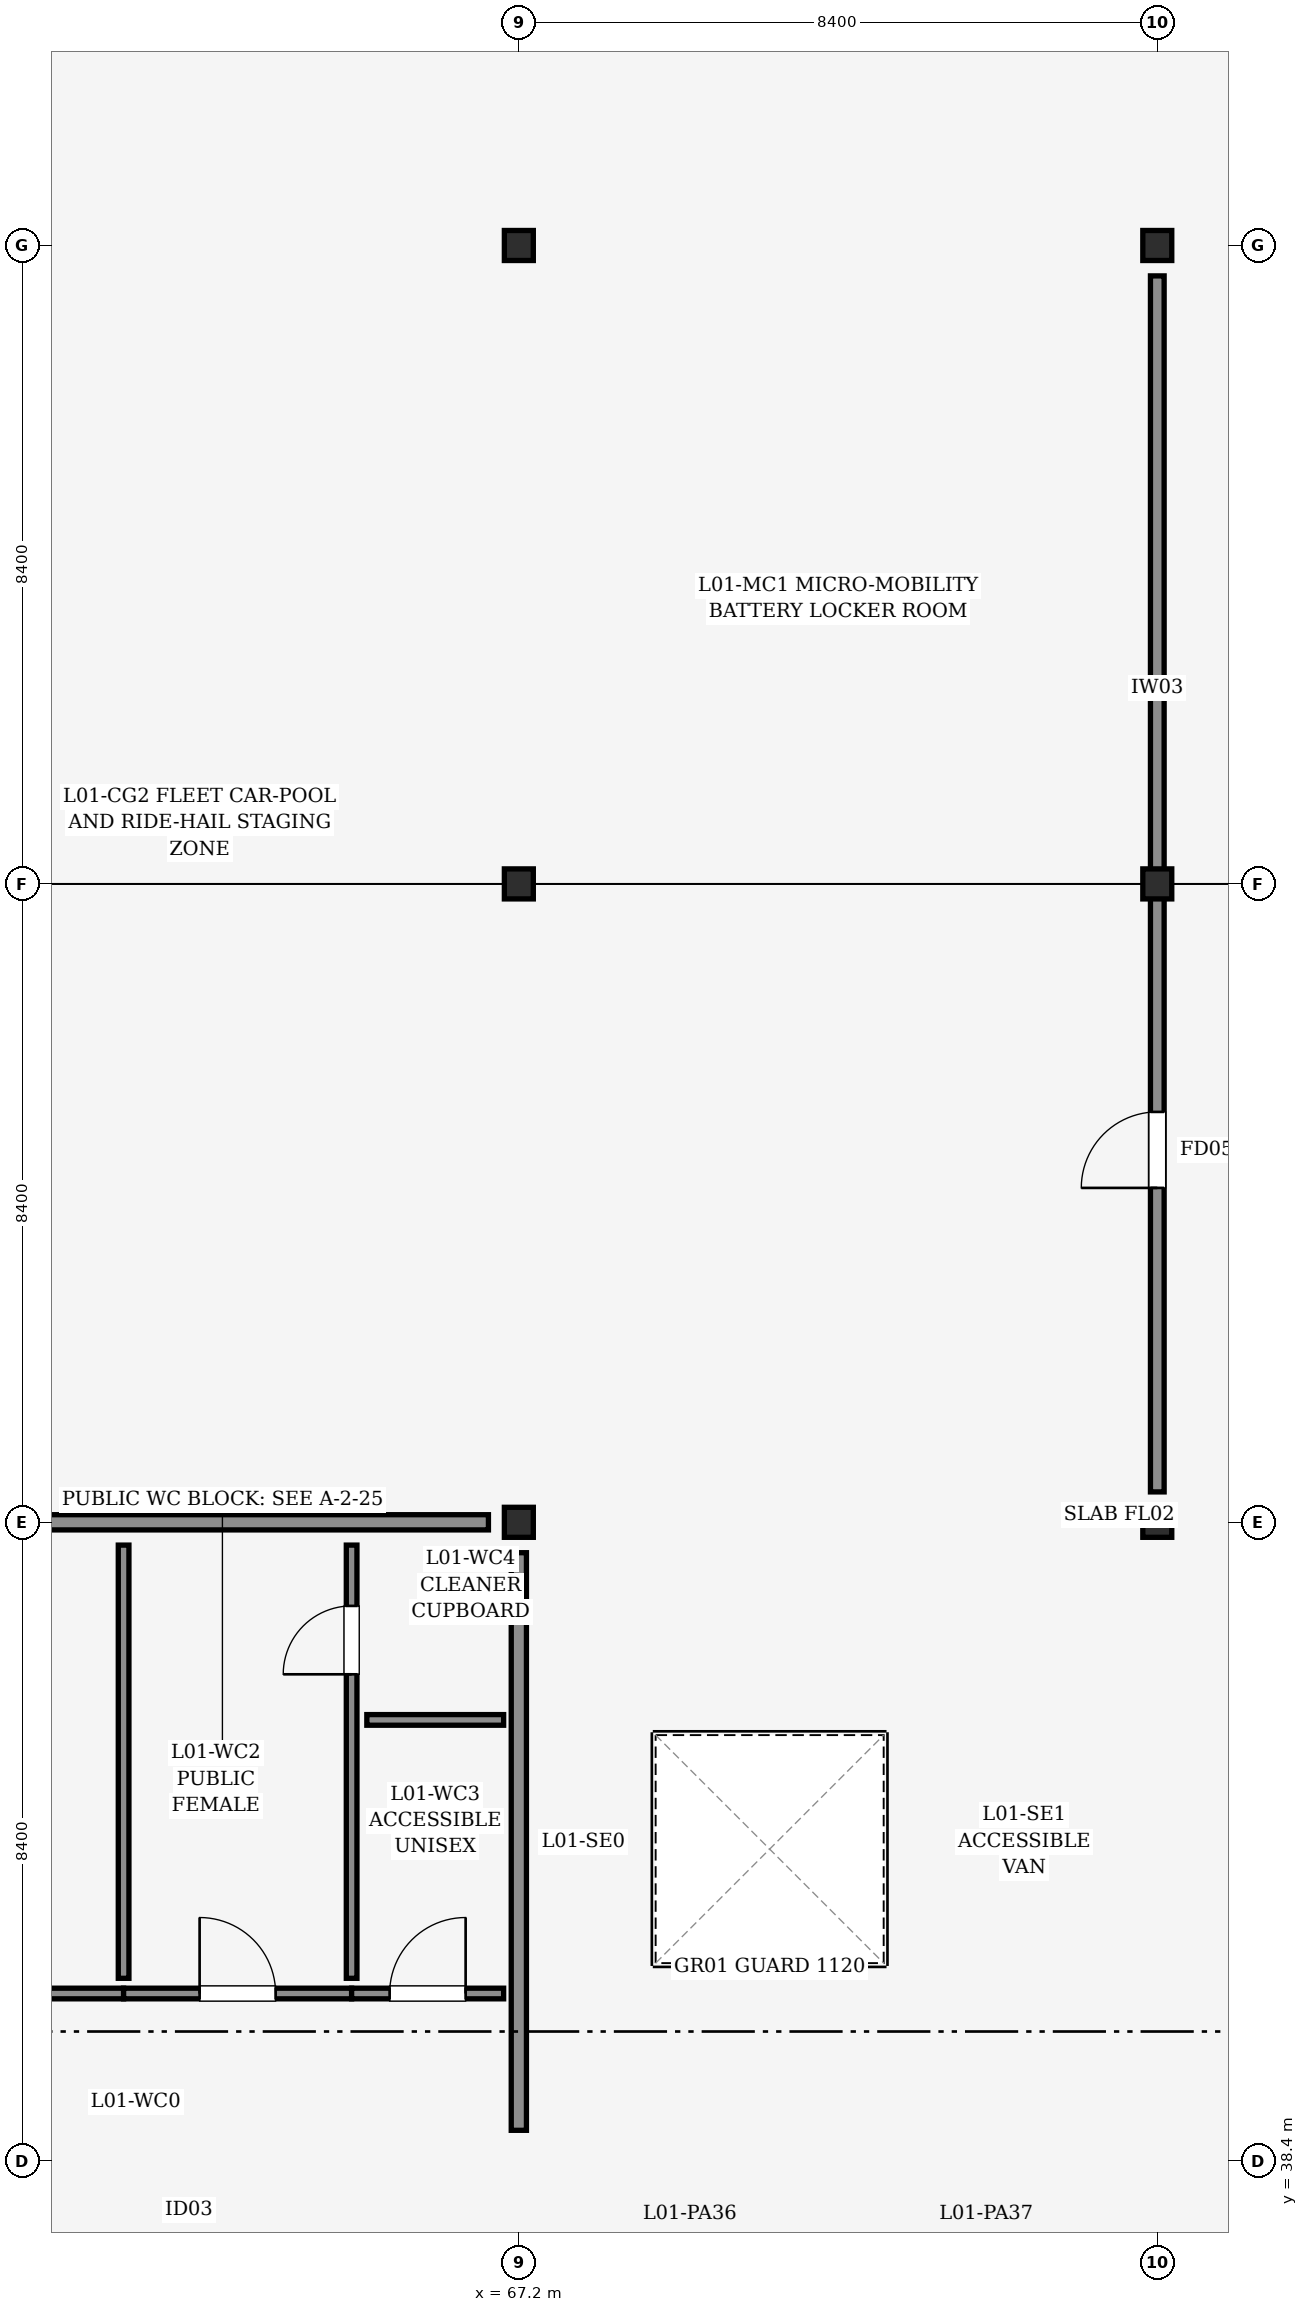
"""IFC4 building model, lengths in metres.
Left out: names, types, materials, properties, quantities, classifications, styles, units other than length and angle.
Written with IfcOpenShell. Run it as: python <this file> out.ifc"""

import sys

from ifc_helpers import new_model, si_unit, direction, frame, frame_2d, origin, origin_2d, place, context, subcontext, project, spatial, rectangle, i_section, extrude, element, fill, save


model = new_model("IFC4")
c1 = context("Model", 3, precision=1e-05, world=origin(), true_north=direction((0.0, 1.0)))
c2 = subcontext(c1, "Body", "Model", "MODEL_VIEW")
j1 = project(units=[si_unit("LENGTHUNIT", "METRE"), si_unit("PLANEANGLEUNIT", "RADIAN")], contexts=[c1])
p1 = place(None, origin())
s1 = spatial("IfcSite", under=j1, at=p1, CompositionType="ELEMENT")
p2 = place(p1, origin())
s2 = spatial("IfcBuilding", under=s1, at=p2, CompositionType="ELEMENT")
p3 = place(p2, frame((0.0, 0.0, 5.4)))
s3 = spatial("IfcBuildingStorey", under=s2, at=p3, CompositionType="ELEMENT", Elevation=5.4)
for number, where, z_axis, x_axis in (
    (1, (67.2, 38.4, 0.0), (0.0, 0.0, 1.0), (1.0, 0.0, 0.0)),
    (2, (67.2, 46.8, 0.0), (0.0, 0.0, 1.0), (1.0, 0.0, 0.0)),
    (3, (67.2, 55.2, 0.0), (0.0, 0.0, 1.0), (1.0, 0.0, 0.0)),
    (4, (67.2, 63.6, 0.0), (0.0, 0.0, 1.0), (1.0, 0.0, 0.0)),
    (5, (75.6, 38.4, 0.0), (0.0, 0.0, 1.0), (1.0, 0.0, 0.0)),
    (6, (75.6, 46.8, 0.0), (0.0, 0.0, 1.0), (1.0, 0.0, 0.0)),
    (7, (75.6, 55.2, 0.0), (0.0, 0.0, 1.0), (1.0, 0.0, 0.0)),
    (8, (75.6, 63.6, 0.0), (0.0, 0.0, 1.0), (1.0, 0.0, 0.0)),
):
    element("IfcColumn", number, at=place(p3, frame(where, z_axis=z_axis, x_axis=x_axis)), inside=s3, PredefinedType="COLUMN", context=c2, shape_type="SweptSolid", body=[
        extrude(i_section(OverallWidth=0.395, OverallDepth=0.381, WebThickness=0.018, FlangeThickness=0.03, FilletRadius=0.015, at=origin_2d()), origin(), (0.0, 0.0, 1.0), 3.6),
    ])
p4 = place(p3, frame((59.2, 38.4, 0.0), z_axis=(0.0, 0.0, 1.0), x_axis=(1.0, 0.0, 0.0)))
e9 = element("IfcWall", 9, at=p4, inside=s3, PredefinedType="PARTITIONING", context=c2, shape_type="SweptSolid", body=[
    extrude(rectangle(XDim=7.6, YDim=0.2, at=frame_2d((3.8, 0.0))), origin(), (0.0, 0.0, 1.0), 2.525),
])
p5 = place(p4, frame((3.2, 0.0, 0.0)))
e10 = element("IfcOpeningElement", 10, at=p5, cuts=e9, PredefinedType="OPENING", context=c2, shape_type="SweptSolid", body=[
    extrude(rectangle(XDim=0.92, YDim=2.1, at=frame_2d((0.46, 1.05))), frame((0.0, 0.11, 0.0), z_axis=(0.0, -1.0, 0.0), x_axis=(1.0, 0.0, 0.0)), (0.0, 0.0, 1.0), 0.22),
])
p6 = place(p3, frame((59.2, 46.8, 0.0), z_axis=(0.0, 0.0, 1.0), x_axis=(1.0, 0.0, 0.0)))
e11 = element("IfcWall", 11, at=p6, inside=s3, PredefinedType="PARTITIONING", context=c2, shape_type="SweptSolid", body=[
    extrude(rectangle(XDim=7.6, YDim=0.2, at=frame_2d((3.8, 0.0))), origin(), (0.0, 0.0, 1.0), 2.525),
])
p7 = place(p3, frame((67.2, 38.8, 0.0), z_axis=(0.0, 0.0, 1.0), x_axis=(0.0, 1.0, 0.0)))
e12 = element("IfcWall", 12, at=p7, inside=s3, PredefinedType="PARTITIONING", context=c2, shape_type="SweptSolid", body=[
    extrude(rectangle(XDim=7.6, YDim=0.2, at=frame_2d((3.8, 0.0))), origin(), (0.0, 0.0, 1.0), 2.525),
])
p8 = place(p3, frame((59.0, 40.6, 0.0), z_axis=(0.0, 0.0, 1.0), x_axis=(1.0, 0.0, 0.0)))
e13 = element("IfcWall", 13, at=p8, inside=s3, PredefinedType="PARTITIONING", context=c2, shape_type="SweptSolid", body=[
    extrude(rectangle(XDim=3.0, YDim=0.14, at=frame_2d((1.5, 0.0))), origin(), (0.0, 0.0, 1.0), 2.525),
])
p9 = place(p8, frame((1.0, 0.0, 0.0)))
e14 = element("IfcOpeningElement", 14, at=p9, cuts=e13, PredefinedType="OPENING", context=c2, shape_type="SweptSolid", body=[
    extrude(rectangle(XDim=1.0, YDim=2.1, at=frame_2d((0.5, 1.05))), frame((0.0, 0.08, 0.0), z_axis=(0.0, -1.0, 0.0), x_axis=(1.0, 0.0, 0.0)), (0.0, 0.0, 1.0), 0.16),
])
p10 = place(p3, frame((62.0, 40.6, 0.0), z_axis=(0.0, 0.0, 1.0), x_axis=(1.0, 0.0, 0.0)))
e15 = element("IfcWall", 15, at=p10, inside=s3, PredefinedType="PARTITIONING", context=c2, shape_type="SweptSolid", body=[
    extrude(rectangle(XDim=3.0, YDim=0.14, at=frame_2d((1.5, 0.0))), origin(), (0.0, 0.0, 1.0), 2.525),
])
p11 = place(p10, frame((1.0, 0.0, 0.0)))
e16 = element("IfcOpeningElement", 16, at=p11, cuts=e15, PredefinedType="OPENING", context=c2, shape_type="SweptSolid", body=[
    extrude(rectangle(XDim=1.0, YDim=2.1, at=frame_2d((0.5, 1.05))), frame((0.0, 0.08, 0.0), z_axis=(0.0, -1.0, 0.0), x_axis=(1.0, 0.0, 0.0)), (0.0, 0.0, 1.0), 0.16),
])
p12 = place(p3, frame((65.0, 40.6, 0.0), z_axis=(0.0, 0.0, 1.0), x_axis=(1.0, 0.0, 0.0)))
e17 = element("IfcWall", 17, at=p12, inside=s3, PredefinedType="PARTITIONING", context=c2, shape_type="SweptSolid", body=[
    extrude(rectangle(XDim=2.0, YDim=0.14, at=frame_2d((1.0, 0.0))), origin(), (0.0, 0.0, 1.0), 2.525),
])
p13 = place(p12, frame((0.5, 0.0, 0.0)))
e18 = element("IfcOpeningElement", 18, at=p13, cuts=e17, PredefinedType="OPENING", context=c2, shape_type="SweptSolid", body=[
    extrude(rectangle(XDim=1.0, YDim=2.1, at=frame_2d((0.5, 1.05))), frame((0.0, 0.08, 0.0), z_axis=(0.0, -1.0, 0.0), x_axis=(1.0, 0.0, 0.0)), (0.0, 0.0, 1.0), 0.16),
])
p14 = place(p3, frame((62.0, 40.8, 0.0), z_axis=(0.0, 0.0, 1.0), x_axis=(0.0, 1.0, 0.0)))
e19 = element("IfcWall", 19, at=p14, inside=s3, PredefinedType="PARTITIONING", context=c2, shape_type="SweptSolid", body=[
    extrude(rectangle(XDim=5.7, YDim=0.14, at=frame_2d((2.85, 0.0))), origin(), (0.0, 0.0, 1.0), 2.525),
])
p15 = place(p3, frame((65.0, 40.8, 0.0), z_axis=(0.0, 0.0, 1.0), x_axis=(0.0, 1.0, 0.0)))
e20 = element("IfcWall", 20, at=p15, inside=s3, PredefinedType="PARTITIONING", context=c2, shape_type="SweptSolid", body=[
    extrude(rectangle(XDim=5.7, YDim=0.14, at=frame_2d((2.85, 0.0))), origin(), (0.0, 0.0, 1.0), 2.525),
])
p16 = place(p15, frame((4.0, 0.0, 0.0)))
e21 = element("IfcOpeningElement", 21, at=p16, cuts=e20, PredefinedType="OPENING", context=c2, shape_type="SweptSolid", body=[
    extrude(rectangle(XDim=0.9, YDim=2.05, at=frame_2d((0.45, 1.025))), frame((0.0, 0.08, 0.0), z_axis=(0.0, -1.0, 0.0), x_axis=(1.0, 0.0, 0.0)), (0.0, 0.0, 1.0), 0.16),
])
p17 = place(p3, frame((65.2, 44.2, 0.0), z_axis=(0.0, 0.0, 1.0), x_axis=(1.0, 0.0, 0.0)))
e22 = element("IfcWall", 22, at=p17, inside=s3, PredefinedType="PARTITIONING", context=c2, shape_type="SweptSolid", body=[
    extrude(rectangle(XDim=1.8, YDim=0.14, at=frame_2d((0.9, 0.0))), origin(), (0.0, 0.0, 1.0), 2.525),
])
p18 = place(p3, frame((75.6, 47.2, 0.0), z_axis=(0.0, 0.0, 1.0), x_axis=(0.0, 1.0, 0.0)))
e23 = element("IfcWall", 23, at=p18, inside=s3, PredefinedType="PARTITIONING", context=c2, shape_type="SweptSolid", body=[
    extrude(rectangle(XDim=16.0, YDim=0.18, at=frame_2d((8.0, 0.0))), origin(), (0.0, 0.0, 1.0), 2.525),
])
p19 = place(p18, frame((4.0, 0.0, 0.0)))
e24 = element("IfcOpeningElement", 24, at=p19, cuts=e23, PredefinedType="OPENING", context=c2, shape_type="SweptSolid", body=[
    extrude(rectangle(XDim=1.0, YDim=2.15, at=frame_2d((0.5, 1.075))), frame((0.0, 0.1, 0.0), z_axis=(0.0, -1.0, 0.0), x_axis=(1.0, 0.0, 0.0)), (0.0, 0.0, 1.0), 0.2),
])
p20 = place(p5, origin())
e25 = element("IfcDoor", 25, at=p20, inside=s3, OperationType="SINGLE_SWING_LEFT", PredefinedType="DOOR", context=c2, shape_type="SweptSolid", body=[
    extrude(rectangle(XDim=0.92, YDim=2.1, at=frame_2d((0.46, 1.05))), frame((0.0, 0.025, 0.0), z_axis=(0.0, -1.0, 0.0), x_axis=(1.0, 0.0, 0.0)), (0.0, 0.0, 1.0), 0.05),
])
fill(e10, e25)
p21 = place(p11, origin())
e26 = element("IfcDoor", 26, at=p21, inside=s3, OperationType="SINGLE_SWING_LEFT", PredefinedType="DOOR", context=c2, shape_type="SweptSolid", body=[
    extrude(rectangle(XDim=1.0, YDim=2.1, at=frame_2d((0.5, 1.05))), frame((0.0, 0.025, 0.0), z_axis=(0.0, -1.0, 0.0), x_axis=(1.0, 0.0, 0.0)), (0.0, 0.0, 1.0), 0.05),
])
fill(e16, e26)
p22 = place(p13, origin())
e27 = element("IfcDoor", 27, at=p22, inside=s3, OperationType="SINGLE_SWING_RIGHT", PredefinedType="DOOR", context=c2, shape_type="SweptSolid", body=[
    extrude(rectangle(XDim=1.0, YDim=2.1, at=frame_2d((0.5, 1.05))), frame((0.0, 0.025, 0.0), z_axis=(0.0, -1.0, 0.0), x_axis=(1.0, 0.0, 0.0)), (0.0, 0.0, 1.0), 0.05),
])
fill(e18, e27)
p23 = place(p16, origin())
e28 = element("IfcDoor", 28, at=p23, inside=s3, OperationType="SINGLE_SWING_LEFT", PredefinedType="DOOR", context=c2, shape_type="SweptSolid", body=[
    extrude(rectangle(XDim=0.9, YDim=2.05, at=frame_2d((0.45, 1.025))), frame((0.0, 0.025, 0.0), z_axis=(0.0, -1.0, 0.0), x_axis=(1.0, 0.0, 0.0)), (0.0, 0.0, 1.0), 0.05),
])
fill(e21, e28)
p24 = place(p19, origin())
e29 = element("IfcDoor", 29, at=p24, inside=s3, OperationType="SINGLE_SWING_LEFT", PredefinedType="DOOR", context=c2, shape_type="SweptSolid", body=[
    extrude(rectangle(XDim=1.0, YDim=2.15, at=frame_2d((0.5, 1.075))), frame((0.0, 0.025, 0.0), z_axis=(0.0, -1.0, 0.0), x_axis=(1.0, 0.0, 0.0)), (0.0, 0.0, 1.0), 0.05),
])
fill(e24, e29)
save(model, sys.argv[1])
